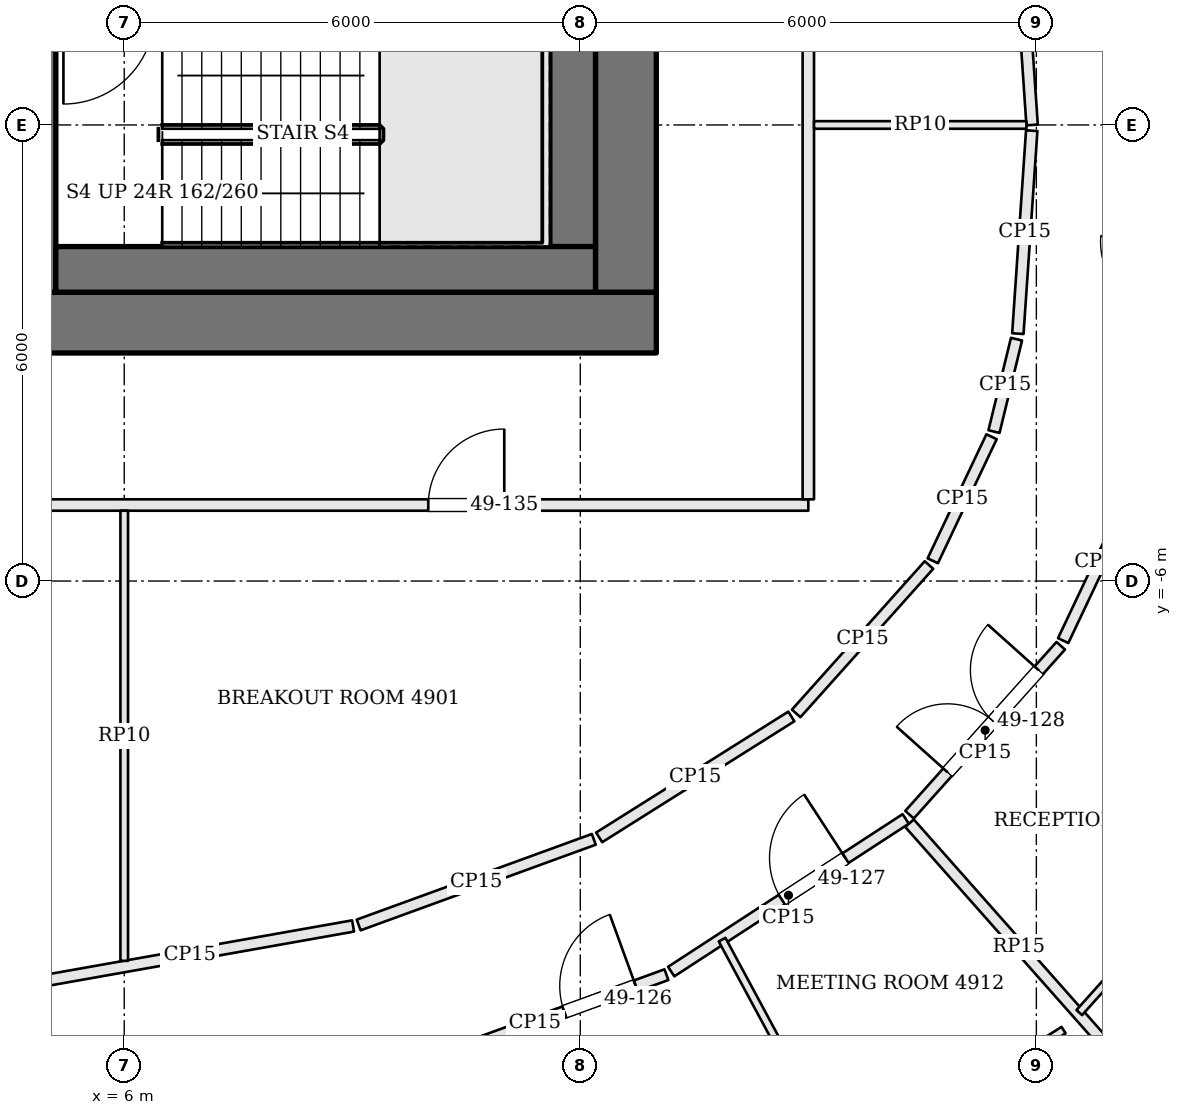
"""IFC4 building model, lengths in metres.
Left out: names, types, materials, properties, quantities, classifications, styles, units other than length and angle.
Written with IfcOpenShell. Run it as: python <this file> out.ifc"""

import sys

from ifc_helpers import new_model, si_unit, direction, frame, frame_2d, origin, place, context, subcontext, project, spatial, rectangle, extrude, element, fill, save


model = new_model("IFC4")
c1 = context("Model", 3, precision=1e-05, world=origin(), true_north=direction((0.0, 1.0)))
c2 = subcontext(c1, "Body", "Model", "MODEL_VIEW")
j1 = project(units=[si_unit("LENGTHUNIT", "METRE"), si_unit("PLANEANGLEUNIT", "RADIAN")], contexts=[c1])
p1 = place(None, origin())
s1 = spatial("IfcSite", under=j1, at=p1, CompositionType="ELEMENT")
p2 = place(p1, origin())
s2 = spatial("IfcBuilding", under=s1, at=p2, CompositionType="ELEMENT")
p3 = place(p2, frame((0.0, 0.0, 201.3)))
s3 = spatial("IfcBuildingStorey", under=s2, at=p3, CompositionType="ELEMENT", Elevation=201.3)
p4 = place(p3, frame((-13.0, -2.6, 0.0), z_axis=(0.0, 0.0, 1.0), x_axis=(1.0, 0.0, 0.0)))
e1 = element("IfcWall", 1, at=p4, inside=s3, PredefinedType="SHEAR", context=c2, shape_type="SweptSolid", body=[
    extrude(rectangle(XDim=26.0, YDim=0.8, at=frame_2d((13.0, 0.0))), origin(), (0.0, 0.0, 1.0), 3.9),
])
p5 = place(p4, frame((9.2, 0.0, 0.0)))
e2 = element("IfcOpeningElement", 2, at=p5, cuts=e1, PredefinedType="OPENING", context=c2, shape_type="SweptSolid", body=[
    extrude(rectangle(XDim=0.9, YDim=2.1, at=frame_2d((0.45, 1.05))), frame((0.0, 0.41, 0.0), z_axis=(0.0, -1.0, 0.0), x_axis=(1.0, 0.0, 0.0)), (0.0, 0.0, 1.0), 0.82),
])
p6 = place(p4, frame((12.3, 0.0, 0.0)))
e3 = element("IfcOpeningElement", 3, at=p6, cuts=e1, PredefinedType="OPENING", context=c2, shape_type="SweptSolid", body=[
    extrude(rectangle(XDim=0.9, YDim=2.1, at=frame_2d((0.45, 1.05))), frame((0.0, 0.41, 0.0), z_axis=(0.0, -1.0, 0.0), x_axis=(1.0, 0.0, 0.0)), (0.0, 0.0, 1.0), 0.82),
])
p7 = place(p4, frame((14.7, 0.0, 0.0)))
e4 = element("IfcOpeningElement", 4, at=p7, cuts=e1, PredefinedType="OPENING", context=c2, shape_type="SweptSolid", body=[
    extrude(rectangle(XDim=1.0, YDim=2.1, at=frame_2d((0.5, 1.05))), frame((0.0, 0.41, 0.0), z_axis=(0.0, -1.0, 0.0), x_axis=(1.0, 0.0, 0.0)), (0.0, 0.0, 1.0), 0.82),
])
p8 = place(p4, frame((16.55, 0.0, 0.0)))
e5 = element("IfcOpeningElement", 5, at=p8, cuts=e1, PredefinedType="OPENING", context=c2, shape_type="SweptSolid", body=[
    extrude(rectangle(XDim=0.9, YDim=2.1, at=frame_2d((0.45, 1.05))), frame((0.0, 0.41, 0.0), z_axis=(0.0, -1.0, 0.0), x_axis=(1.0, 0.0, 0.0)), (0.0, 0.0, 1.0), 0.82),
])
p9 = place(p3, frame((12.6, -2.2, 0.0), z_axis=(0.0, 0.0, 1.0), x_axis=(0.0, 1.0, 0.0)))
e6 = element("IfcWall", 6, at=p9, inside=s3, PredefinedType="SHEAR", context=c2, shape_type="SweptSolid", body=[
    extrude(rectangle(XDim=13.4, YDim=0.8, at=frame_2d((6.7, 0.0))), origin(), (0.0, 0.0, 1.0), 3.9),
])
p10 = place(p9, frame((7.4, 0.0, 0.0)))
e7 = element("IfcOpeningElement", 7, at=p10, cuts=e6, PredefinedType="OPENING", context=c2, shape_type="SweptSolid", body=[
    extrude(rectangle(XDim=1.8, YDim=2.1, at=frame_2d((0.9, 1.05))), frame((0.0, 0.41, 0.0), z_axis=(0.0, -1.0, 0.0), x_axis=(1.0, 0.0, 0.0)), (0.0, 0.0, 1.0), 0.82),
])
p11 = place(p3, frame((4.975, 11.2, 0.0), z_axis=(0.0, 0.0, 1.0), x_axis=(0.0, -1.0, 0.0)))
e8 = element("IfcWall", 8, at=p11, inside=s3, PredefinedType="SOLIDWALL", context=c2, shape_type="SweptSolid", body=[
    extrude(rectangle(XDim=13.4, YDim=0.25, at=frame_2d((6.7, 0.0))), origin(), (0.0, 0.0, 1.0), 3.7),
])
p12 = place(p11, frame((5.25, 0.0, 0.0)))
e9 = element("IfcOpeningElement", 9, at=p12, cuts=e8, PredefinedType="OPENING", context=c2, shape_type="SweptSolid", body=[
    extrude(rectangle(XDim=1.2, YDim=2.1, at=frame_2d((0.6, 1.05))), frame((0.0, 0.135, 0.0), z_axis=(0.0, -1.0, 0.0), x_axis=(1.0, 0.0, 0.0)), (0.0, 0.0, 1.0), 0.27),
])
p13 = place(p3, frame((11.9, 1.35, 0.0), z_axis=(0.0, 0.0, 1.0), x_axis=(0.0, -1.0, 0.0)))
e10 = element("IfcWall", 10, at=p13, inside=s3, PredefinedType="SOLIDWALL", context=c2, shape_type="SweptSolid", body=[
    extrude(rectangle(XDim=2.95, YDim=0.6, at=frame_2d((1.475, 0.0))), origin(), (0.0, 0.0, 1.0), 3.7),
])
p14 = place(p3, frame((12.2, -1.9, 0.0), z_axis=(0.0, 0.0, 1.0), x_axis=(-1.0, 0.0, 0.0)))
e11 = element("IfcWall", 11, at=p14, inside=s3, PredefinedType="SOLIDWALL", context=c2, shape_type="SweptSolid", body=[
    extrude(rectangle(XDim=7.1, YDim=0.6, at=frame_2d((3.55, 0.0))), origin(), (0.0, 0.0, 1.0), 3.7),
])
p15 = place(p3, frame((9.676, -12.438, 0.0), z_axis=(0.0, 0.0, 1.0), x_axis=(0.939640289748, 0.342163887461, 0.0)))
e12 = element("IfcWall", 12, at=p15, inside=s3, PredefinedType="PARTITIONING", context=c2, shape_type="SweptSolid", body=[
    extrude(rectangle(XDim=3.68, YDim=0.15, at=frame_2d((1.84, 0.0))), origin(), (0.0, 0.0, 1.0), 3.084),
])
p16 = place(p15, frame((2.25, 0.0, 0.0)))
e13 = element("IfcOpeningElement", 13, at=p16, cuts=e12, PredefinedType="OPENING", context=c2, shape_type="SweptSolid", body=[
    extrude(rectangle(XDim=1.0, YDim=2.4, at=frame_2d((0.5, 1.2))), frame((0.0, 0.085, 0.0), z_axis=(0.0, -1.0, 0.0), x_axis=(1.0, 0.0, 0.0)), (0.0, 0.0, 1.0), 0.17),
])
p17 = place(p3, frame((13.196, -11.138, 0.0), z_axis=(0.0, 0.0, 1.0), x_axis=(0.838161670129, 0.545421868582, 0.0)))
e14 = element("IfcWall", 14, at=p17, inside=s3, PredefinedType="PARTITIONING", context=c2, shape_type="SweptSolid", body=[
    extrude(rectangle(XDim=3.681, YDim=0.15, at=frame_2d((1.841, 0.0))), origin(), (0.0, 0.0, 1.0), 3.084),
])
p18 = place(p17, frame((1.736, 0.0, 0.0)))
e15 = element("IfcOpeningElement", 15, at=p18, cuts=e14, PredefinedType="OPENING", context=c2, shape_type="SweptSolid", body=[
    extrude(rectangle(XDim=1.0, YDim=2.4, at=frame_2d((0.5, 1.2))), frame((0.0, 0.085, 0.0), z_axis=(0.0, -1.0, 0.0), x_axis=(1.0, 0.0, 0.0)), (0.0, 0.0, 1.0), 0.17),
])
p19 = place(p3, frame((19.21, -12.435, 0.0), z_axis=(0.0, 0.0, 1.0), x_axis=(-0.663127094929, 0.748506817584, 0.0)))
e16 = element("IfcWall", 16, at=p19, inside=s3, PredefinedType="PARTITIONING", context=c2, shape_type="SweptSolid", body=[
    extrude(rectangle(XDim=4.341, YDim=0.15, at=frame_2d((2.17, 0.0))), origin(), (0.0, 0.0, 1.0), 3.084),
])
p20 = place(p3, frame((16.332, -9.074, 0.0), z_axis=(0.0, 0.0, 1.0), x_axis=(0.666900122351, 0.74514711756, 0.0)))
e17 = element("IfcWall", 17, at=p20, inside=s3, PredefinedType="PARTITIONING", context=c2, shape_type="SweptSolid", body=[
    extrude(rectangle(XDim=2.983, YDim=0.15, at=frame_2d((1.491, 0.0))), origin(), (0.0, 0.0, 1.0), 3.084),
])
p21 = place(p20, frame((0.75, 0.0, 0.0)))
e18 = element("IfcOpeningElement", 18, at=p21, cuts=e17, PredefinedType="OPENING", context=c2, shape_type="SweptSolid", body=[
    extrude(rectangle(XDim=1.8, YDim=2.1, at=frame_2d((0.9, 1.05))), frame((0.0, 0.085, 0.0), z_axis=(0.0, -1.0, 0.0), x_axis=(1.0, 0.0, 0.0)), (0.0, 0.0, 1.0), 0.17),
])
p22 = place(p3, frame((18.353, -6.784, 0.0), z_axis=(0.0, 0.0, 1.0), x_axis=(0.428086344739, 0.903737838894, 0.0)))
e19 = element("IfcWall", 19, at=p22, inside=s3, PredefinedType="PARTITIONING", context=c2, shape_type="SweptSolid", body=[
    extrude(rectangle(XDim=2.3, YDim=0.15, at=frame_2d((1.15, 0.0))), origin(), (0.0, 0.0, 1.0), 3.084),
])
p23 = place(p3, frame((17.762, 2.67, 0.0), z_axis=(0.0, 0.0, 1.0), x_axis=(0.068135311644, -0.997676089373, 0.0)))
e20 = element("IfcWall", 20, at=p23, inside=s3, PredefinedType="PARTITIONING", context=c2, shape_type="SweptSolid", body=[
    extrude(rectangle(XDim=2.677, YDim=0.15, at=frame_2d((1.338, 0.0))), origin(), (0.0, 0.0, 1.0), 3.084),
])
p24 = place(p3, frame((17.939, -0.075, 0.0), z_axis=(0.0, 0.0, 1.0), x_axis=(-0.068226099283, -0.99766988497, 0.0)))
e21 = element("IfcWall", 21, at=p24, inside=s3, PredefinedType="PARTITIONING", context=c2, shape_type="SweptSolid", body=[
    extrude(rectangle(XDim=2.677, YDim=0.15, at=frame_2d((1.338, 0.0))), origin(), (0.0, 0.0, 1.0), 3.084),
])
p25 = place(p3, frame((17.739, -2.818, 0.0), z_axis=(0.0, 0.0, 1.0), x_axis=(-0.236884307907, -0.971537865792, 0.0)))
e22 = element("IfcWall", 22, at=p25, inside=s3, PredefinedType="PARTITIONING", context=c2, shape_type="SweptSolid", body=[
    extrude(rectangle(XDim=1.251, YDim=0.15, at=frame_2d((0.625, 0.0))), origin(), (0.0, 0.0, 1.0), 3.084),
])
p26 = place(p3, frame((17.41, -4.102, 0.0), z_axis=(0.0, 0.0, 1.0), x_axis=(-0.428074720318, -0.903743345107, 0.0)))
e23 = element("IfcWall", 23, at=p26, inside=s3, PredefinedType="PARTITIONING", context=c2, shape_type="SweptSolid", body=[
    extrude(rectangle(XDim=1.806, YDim=0.15, at=frame_2d((0.903, 0.0))), origin(), (0.0, 0.0, 1.0), 3.084),
])
p27 = place(p3, frame((16.587, -5.789, 0.0), z_axis=(0.0, 0.0, 1.0), x_axis=(-0.666887460656, -0.745158449472, 0.0)))
e24 = element("IfcWall", 24, at=p27, inside=s3, PredefinedType="PARTITIONING", context=c2, shape_type="SweptSolid", body=[
    extrude(rectangle(XDim=2.62, YDim=0.15, at=frame_2d((1.31, 0.0))), origin(), (0.0, 0.0, 1.0), 3.084),
])
p28 = place(p3, frame((14.777, -7.781, 0.0), z_axis=(0.0, 0.0, 1.0), x_axis=(-0.846359741043, -0.532611667862, 0.0)))
e25 = element("IfcWall", 25, at=p28, inside=s3, PredefinedType="PARTITIONING", context=c2, shape_type="SweptSolid", body=[
    extrude(rectangle(XDim=2.987, YDim=0.15, at=frame_2d((1.494, 0.0))), origin(), (0.0, 0.0, 1.0), 3.084),
])
p29 = place(p3, frame((12.178, -9.398, 0.0), z_axis=(0.0, 0.0, 1.0), x_axis=(-0.939609240084, -0.342249143093, 0.0)))
e26 = element("IfcWall", 26, at=p29, inside=s3, PredefinedType="PARTITIONING", context=c2, shape_type="SweptSolid", body=[
    extrude(rectangle(XDim=3.292, YDim=0.15, at=frame_2d((1.646, 0.0))), origin(), (0.0, 0.0, 1.0), 3.084),
])
p30 = place(p3, frame((9.01, -10.538, 0.0), z_axis=(0.0, 0.0, 1.0), x_axis=(-0.984645638575, -0.174565077936, 0.0)))
e27 = element("IfcWall", 27, at=p30, inside=s3, PredefinedType="PARTITIONING", context=c2, shape_type="SweptSolid", body=[
    extrude(rectangle(XDim=4.358, YDim=0.15, at=frame_2d((2.179, 0.0))), origin(), (0.0, 0.0, 1.0), 3.084),
])
p31 = place(p3, frame((-14.925, -5.0, 0.0), z_axis=(0.0, 0.0, 1.0), x_axis=(1.0, 0.0, 0.0)))
e28 = element("IfcWall", 28, at=p31, inside=s3, PredefinedType="PARTITIONING", context=c2, shape_type="SweptSolid", body=[
    extrude(rectangle(XDim=29.925, YDim=0.15, at=frame_2d((14.962, 0.0))), origin(), (0.0, 0.0, 1.0), 3.084),
])
p32 = place(p31, frame((3.925, 0.0, 0.0)))
e29 = element("IfcOpeningElement", 29, at=p32, cuts=e28, PredefinedType="OPENING", context=c2, shape_type="SweptSolid", body=[
    extrude(rectangle(XDim=1.0, YDim=2.1, at=frame_2d((0.5, 1.05))), frame((0.0, 0.085, 0.0), z_axis=(0.0, -1.0, 0.0), x_axis=(1.0, 0.0, 0.0)), (0.0, 0.0, 1.0), 0.17),
])
p33 = place(p31, frame((14.025, 0.0, 0.0)))
e30 = element("IfcOpeningElement", 30, at=p33, cuts=e28, PredefinedType="OPENING", context=c2, shape_type="SweptSolid", body=[
    extrude(rectangle(XDim=1.8, YDim=2.1, at=frame_2d((0.9, 1.05))), frame((0.0, 0.085, 0.0), z_axis=(0.0, -1.0, 0.0), x_axis=(1.0, 0.0, 0.0)), (0.0, 0.0, 1.0), 0.17),
])
p34 = place(p31, frame((24.925, 0.0, 0.0)))
e31 = element("IfcOpeningElement", 31, at=p34, cuts=e28, PredefinedType="OPENING", context=c2, shape_type="SweptSolid", body=[
    extrude(rectangle(XDim=1.0, YDim=2.1, at=frame_2d((0.5, 1.05))), frame((0.0, 0.085, 0.0), z_axis=(0.0, -1.0, 0.0), x_axis=(1.0, 0.0, 0.0)), (0.0, 0.0, 1.0), 0.17),
])
p35 = place(p3, frame((15.0, -4.925, 0.0), z_axis=(0.0, 0.0, 1.0), x_axis=(0.0, 1.0, 0.0)))
e32 = element("IfcWall", 32, at=p35, inside=s3, PredefinedType="PARTITIONING", context=c2, shape_type="SweptSolid", body=[
    extrude(rectangle(XDim=12.583, YDim=0.15, at=frame_2d((6.292, 0.0))), origin(), (0.0, 0.0, 1.0), 3.084),
])
p36 = place(p35, frame((8.291, 0.0, 0.0)))
e33 = element("IfcOpeningElement", 33, at=p36, cuts=e32, PredefinedType="OPENING", context=c2, shape_type="SweptSolid", body=[
    extrude(rectangle(XDim=1.0, YDim=2.1, at=frame_2d((0.5, 1.05))), frame((0.0, 0.085, 0.0), z_axis=(0.0, -1.0, 0.0), x_axis=(1.0, 0.0, 0.0)), (0.0, 0.0, 1.0), 0.17),
])
p37 = place(p3, frame((18.358, -11.908, 0.0), z_axis=(0.0, 0.0, 1.0), x_axis=(-0.846371924556, -0.532592306857, 0.0)))
e34 = element("IfcWall", 34, at=p37, inside=s3, PredefinedType="PARTITIONING", context=c2, shape_type="SweptSolid", body=[
    extrude(rectangle(XDim=4.396, YDim=0.1, at=frame_2d((2.198, 0.0))), origin(), (0.0, 0.0, 1.0), 3.084),
])
p38 = place(p3, frame((13.865, -10.718, 0.0), z_axis=(0.0, 0.0, 1.0), x_axis=(0.474286256433, -0.880370687244, 0.0)))
e35 = element("IfcWall", 35, at=p38, inside=s3, PredefinedType="PARTITIONING", context=c2, shape_type="SweptSolid", body=[
    extrude(rectangle(XDim=3.358, YDim=0.1, at=frame_2d((1.679, 0.0))), origin(), (0.0, 0.0, 1.0), 3.084),
])
p39 = place(p3, frame((21.149, -8.789, 0.0), z_axis=(0.0, 0.0, 1.0), x_axis=(-0.666936636431, -0.745114436168, 0.0)))
e36 = element("IfcWall", 36, at=p39, inside=s3, PredefinedType="PARTITIONING", context=c2, shape_type="SweptSolid", body=[
    extrude(rectangle(XDim=3.875, YDim=0.1, at=frame_2d((1.938, 0.0))), origin(), (0.0, 0.0, 1.0), 3.084),
])
p40 = place(p39, frame((0.594, 0.0, 0.0)))
e37 = element("IfcOpeningElement", 37, at=p40, cuts=e36, PredefinedType="OPENING", context=c2, shape_type="SweptSolid", body=[
    extrude(rectangle(XDim=1.0, YDim=2.1, at=frame_2d((0.5, 1.05))), frame((0.0, 0.06, 0.0), z_axis=(0.0, -1.0, 0.0), x_axis=(1.0, 0.0, 0.0)), (0.0, 0.0, 1.0), 0.12),
])
p41 = place(p3, frame((6.0, -10.997, 0.0), z_axis=(0.0, 0.0, 1.0), x_axis=(0.0, 1.0, 0.0)))
e38 = element("IfcWall", 38, at=p41, inside=s3, PredefinedType="PARTITIONING", context=c2, shape_type="SweptSolid", body=[
    extrude(rectangle(XDim=5.922, YDim=0.1, at=frame_2d((2.961, 0.0))), origin(), (0.0, 0.0, 1.0), 3.084),
])
p42 = place(p3, frame((15.075, 0.0, 0.0), z_axis=(0.0, 0.0, 1.0), x_axis=(1.0, 0.0, 0.0)))
e39 = element("IfcWall", 39, at=p42, inside=s3, PredefinedType="PARTITIONING", context=c2, shape_type="SweptSolid", body=[
    extrude(rectangle(XDim=2.794, YDim=0.1, at=frame_2d((1.397, 0.0))), origin(), (0.0, 0.0, 1.0), 3.084),
])
p43 = place(p16, origin())
e40 = element("IfcDoor", 40, at=p43, inside=s3, OperationType="SINGLE_SWING_RIGHT", PredefinedType="DOOR", context=c2, shape_type="SweptSolid", body=[
    extrude(rectangle(XDim=1.0, YDim=2.4, at=frame_2d((0.5, 1.2))), frame((0.0, 0.025, 0.0), z_axis=(0.0, -1.0, 0.0), x_axis=(1.0, 0.0, 0.0)), (0.0, 0.0, 1.0), 0.05),
])
fill(e13, e40)
p44 = place(p18, origin())
e41 = element("IfcDoor", 41, at=p44, inside=s3, OperationType="SINGLE_SWING_RIGHT", PredefinedType="DOOR", context=c2, shape_type="SweptSolid", body=[
    extrude(rectangle(XDim=1.0, YDim=2.4, at=frame_2d((0.5, 1.2))), frame((0.0, 0.025, 0.0), z_axis=(0.0, -1.0, 0.0), x_axis=(1.0, 0.0, 0.0)), (0.0, 0.0, 1.0), 0.05),
])
fill(e15, e41)
p45 = place(p21, origin())
e42 = element("IfcDoor", 42, at=p45, inside=s3, OperationType="DOUBLE_DOOR_SINGLE_SWING", PredefinedType="DOOR", context=c2, shape_type="SweptSolid", body=[
    extrude(rectangle(XDim=1.8, YDim=2.1, at=frame_2d((0.9, 1.05))), frame((0.0, 0.025, 0.0), z_axis=(0.0, -1.0, 0.0), x_axis=(1.0, 0.0, 0.0)), (0.0, 0.0, 1.0), 0.05),
])
fill(e18, e42)
p46 = place(p34, origin())
e43 = element("IfcDoor", 43, at=p46, inside=s3, OperationType="SINGLE_SWING_RIGHT", PredefinedType="DOOR", context=c2, shape_type="SweptSolid", body=[
    extrude(rectangle(XDim=1.0, YDim=2.1, at=frame_2d((0.5, 1.05))), frame((0.0, 0.025, 0.0), z_axis=(0.0, -1.0, 0.0), x_axis=(1.0, 0.0, 0.0)), (0.0, 0.0, 1.0), 0.05),
])
fill(e31, e43)
save(model, sys.argv[1])
